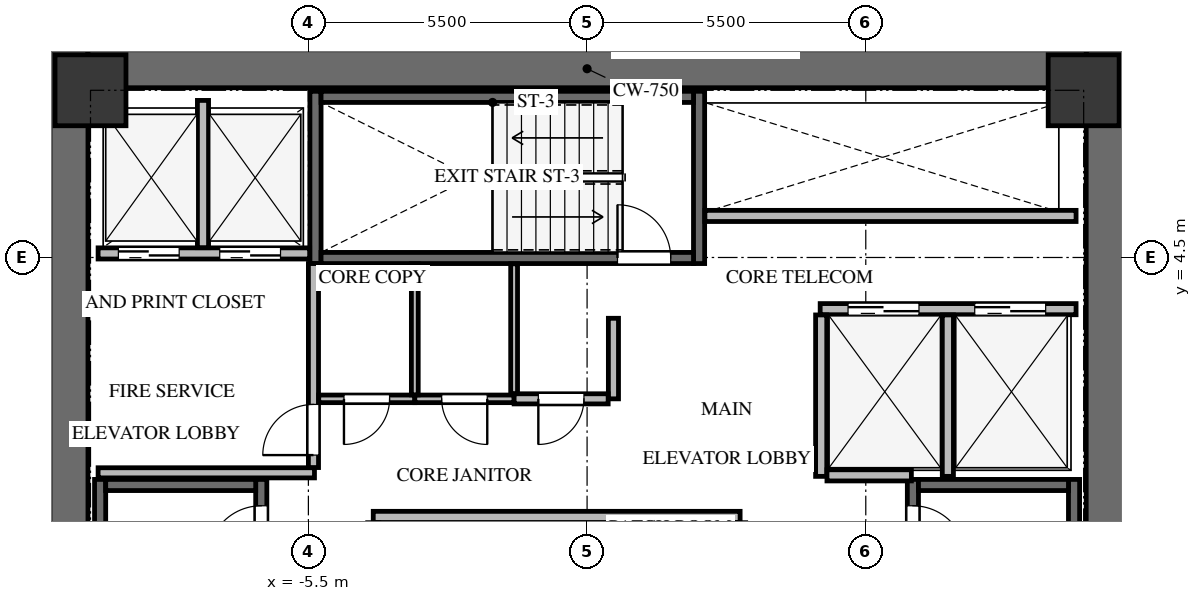
"""IFC4 building model, lengths in metres.
Left out: names, types, materials, properties, quantities, classifications, styles, units other than length and angle.
Written with IfcOpenShell. Run it as: python <this file> out.ifc"""

import sys

from ifc_helpers import new_model, si_unit, direction, frame, frame_2d, origin, origin_2d, place, context, subcontext, project, spatial, rectangle, extrude, source, transform, mapped, element, fill, save


model = new_model("IFC4")
c1 = context("Model", 3, precision=1e-05, world=origin(), true_north=direction((0.0, 1.0)))
c2 = subcontext(c1, "Body", "Model", "MODEL_VIEW")
j1 = project(units=[si_unit("LENGTHUNIT", "METRE"), si_unit("PLANEANGLEUNIT", "RADIAN")], contexts=[c1])
p1 = place(None, origin())
s1 = spatial("IfcSite", under=j1, at=p1, CompositionType="ELEMENT")
p2 = place(p1, origin())
s2 = spatial("IfcBuilding", under=s1, at=p2, CompositionType="ELEMENT")
p3 = place(p2, frame((0.0, 0.0, 133.8)))
s3 = spatial("IfcBuildingStorey", under=s2, at=p3, CompositionType="ELEMENT", Elevation=133.8)
for number, where, z_axis, x_axis in (
    (1, (-10.225, -8.6, 0.0), (0.0, 0.0, 1.0), (0.0, 1.0, 0.0)),
    (2, (10.225, -8.6, 0.0), (0.0, 0.0, 1.0), (0.0, 1.0, 0.0)),
):
    element("IfcWall", number, at=place(p3, frame(where, z_axis=z_axis, x_axis=x_axis)), inside=s3, PredefinedType="SHEAR", context=c2, shape_type="SweptSolid", body=[
        extrude(rectangle(XDim=17.2, YDim=0.75, at=frame_2d((8.6, 0.0))), origin(), (0.0, 0.0, 1.0), 3.3),
    ])
p4 = place(p3, frame((-9.85, 8.225, 0.0), z_axis=(0.0, 0.0, 1.0), x_axis=(1.0, 0.0, 0.0)))
e3 = element("IfcWall", 3, at=p4, inside=s3, PredefinedType="SHEAR", context=c2, shape_type="SweptSolid", body=[
    extrude(rectangle(XDim=19.7, YDim=0.75, at=frame_2d((9.85, 0.0))), origin(), (0.0, 0.0, 1.0), 3.3),
])
p5 = place(p3, frame((-6.43, -7.77, -0.24), z_axis=(0.0, 0.0, 1.0), x_axis=(0.0, 1.0, 0.0)))
e4 = element("IfcWall", 4, at=p5, inside=s3, PredefinedType="SHEAR", context=c2, shape_type="SweptSolid", body=[
    extrude(rectangle(XDim=7.89, YDim=0.22, at=frame_2d((3.945, 0.0))), origin(), (0.0, 0.0, 1.0), 3.3),
])
p6 = place(p5, frame((6.32, 0.0, 0.0)))
e5 = element("IfcOpeningElement", 5, at=p6, cuts=e4, PredefinedType="OPENING", context=c2, shape_type="SweptSolid", body=[
    extrude(rectangle(XDim=1.05, YDim=2.15, at=frame_2d((0.525, 1.075))), frame((0.0, 0.12, 0.0), z_axis=(0.0, -1.0, 0.0), x_axis=(1.0, 0.0, 0.0)), (0.0, 0.0, 1.0), 0.24),
])
p7 = place(p3, frame((-9.61, 0.12, -0.24), z_axis=(0.0, 0.0, 1.0), x_axis=(0.0, -1.0, 0.0)))
e6 = element("IfcWall", 6, at=p7, inside=s3, PredefinedType="SHEAR", context=c2, shape_type="SweptSolid", body=[
    extrude(rectangle(XDim=7.89, YDim=0.22, at=frame_2d((3.945, 0.0))), origin(), (0.0, 0.0, 1.0), 3.3),
])
p8 = place(p3, frame((-6.54, 0.01, -0.24), z_axis=(0.0, 0.0, 1.0), x_axis=(-1.0, 0.0, 0.0)))
e7 = element("IfcWall", 7, at=p8, inside=s3, PredefinedType="SHEAR", context=c2, shape_type="SweptSolid", body=[
    extrude(rectangle(XDim=2.96, YDim=0.22, at=frame_2d((1.48, 0.0))), origin(), (0.0, 0.0, 1.0), 3.3),
])
p9 = place(p3, frame((9.61, -7.77, -0.24), z_axis=(0.0, 0.0, 1.0), x_axis=(0.0, 1.0, 0.0)))
e8 = element("IfcWall", 8, at=p9, inside=s3, PredefinedType="SHEAR", context=c2, shape_type="SweptSolid", body=[
    extrude(rectangle(XDim=7.89, YDim=0.22, at=frame_2d((3.945, 0.0))), origin(), (0.0, 0.0, 1.0), 3.3),
])
p10 = place(p3, frame((6.43, 0.12, -0.24), z_axis=(0.0, 0.0, 1.0), x_axis=(0.0, -1.0, 0.0)))
e9 = element("IfcWall", 9, at=p10, inside=s3, PredefinedType="SHEAR", context=c2, shape_type="SweptSolid", body=[
    extrude(rectangle(XDim=7.89, YDim=0.22, at=frame_2d((3.945, 0.0))), origin(), (0.0, 0.0, 1.0), 3.3),
])
p11 = place(p10, frame((0.52, 0.0, 0.0)))
e10 = element("IfcOpeningElement", 10, at=p11, cuts=e9, PredefinedType="OPENING", context=c2, shape_type="SweptSolid", body=[
    extrude(rectangle(XDim=1.05, YDim=2.15, at=frame_2d((0.525, 1.075))), frame((0.0, 0.12, 0.0), z_axis=(0.0, -1.0, 0.0), x_axis=(1.0, 0.0, 0.0)), (0.0, 0.0, 1.0), 0.24),
])
p12 = place(p3, frame((9.5, 0.01, -0.24), z_axis=(0.0, 0.0, 1.0), x_axis=(-1.0, 0.0, 0.0)))
e11 = element("IfcWall", 11, at=p12, inside=s3, PredefinedType="SHEAR", context=c2, shape_type="SweptSolid", body=[
    extrude(rectangle(XDim=2.96, YDim=0.22, at=frame_2d((1.48, 0.0))), origin(), (0.0, 0.0, 1.0), 3.3),
])
for number, where, z_axis, x_axis in (
    (12, (2.21, 4.38, -0.24), (0.0, 0.0, 1.0), (0.0, 1.0, 0.0)),
    (13, (-5.36, 7.78, -0.24), (0.0, 0.0, 1.0), (0.0, -1.0, 0.0)),
):
    element("IfcWall", number, at=place(p3, frame(where, z_axis=z_axis, x_axis=x_axis)), inside=s3, PredefinedType="SHEAR", context=c2, shape_type="SweptSolid", body=[
        extrude(rectangle(XDim=3.4, YDim=0.22, at=frame_2d((1.7, 0.0))), origin(), (0.0, 0.0, 1.0), 3.3),
    ])
p13 = place(p3, frame((-5.25, 4.49, -0.24), z_axis=(0.0, 0.0, 1.0), x_axis=(1.0, 0.0, 0.0)))
e14 = element("IfcWall", 14, at=p13, inside=s3, PredefinedType="SHEAR", context=c2, shape_type="SweptSolid", body=[
    extrude(rectangle(XDim=7.35, YDim=0.22, at=frame_2d((3.675, 0.0))), origin(), (0.0, 0.0, 1.0), 3.3),
])
p14 = place(p13, frame((5.85, 0.0, 0.0)))
e15 = element("IfcOpeningElement", 15, at=p14, cuts=e14, PredefinedType="OPENING", context=c2, shape_type="SweptSolid", body=[
    extrude(rectangle(XDim=1.05, YDim=2.15, at=frame_2d((0.525, 1.075))), frame((0.0, 0.12, 0.0), z_axis=(0.0, -1.0, 0.0), x_axis=(1.0, 0.0, 0.0)), (0.0, 0.0, 1.0), 0.24),
])
p15 = place(p3, frame((2.1, 7.67, -0.24), z_axis=(0.0, 0.0, 1.0), x_axis=(-1.0, 0.0, 0.0)))
e16 = element("IfcWall", 16, at=p15, inside=s3, PredefinedType="SHEAR", context=c2, shape_type="SweptSolid", body=[
    extrude(rectangle(XDim=7.35, YDim=0.22, at=frame_2d((3.675, 0.0))), origin(), (0.0, 0.0, 1.0), 3.3),
])
m1 = source(origin(), c2, "Body", "SweptSolid", [
    extrude(rectangle(XDim=1.4, YDim=1.4, at=origin_2d()), origin(), (0.0, 0.0, 1.0), 3.3),
])
for number, where, z_axis, x_axis in (
    (17, (9.8, 7.8, -0.24), (0.0, 0.0, 1.0), (1.0, 0.0, 0.0)),
    (18, (-9.8, 7.8, -0.24), (0.0, 0.0, 1.0), (1.0, 0.0, 0.0)),
):
    element("IfcColumn", number, at=place(p3, frame(where, z_axis=z_axis, x_axis=x_axis)), inside=s3, PredefinedType="COLUMN", context=c2, shape_type="MappedRepresentation", body=[
        mapped(m1, transform((0.0, 0.0, 0.0), x_axis=(1.0, 0.0, 0.0), y_axis=(0.0, 1.0, 0.0), z_axis=(0.0, 0.0, 1.0), scale=1.0)),
    ])
p16 = place(p3, frame((-9.65, 4.58, 0.0), z_axis=(0.0, 0.0, 1.0), x_axis=(1.0, 0.0, 0.0)))
e19 = element("IfcWall", 19, at=p16, inside=s3, PredefinedType="SOLIDWALL", context=c2, shape_type="SweptSolid", body=[
    extrude(rectangle(XDim=4.175, YDim=0.22, at=frame_2d((2.087, 0.0))), origin(), (0.0, 0.0, 1.0), 3.045),
])
p17 = place(p16, frame((0.4, 0.0, 0.0)))
e20 = element("IfcOpeningElement", 20, at=p17, cuts=e19, PredefinedType="OPENING", context=c2, shape_type="SweptSolid", body=[
    extrude(rectangle(XDim=1.2, YDim=2.15, at=frame_2d((0.6, 1.075))), frame((0.0, 0.12, 0.0), z_axis=(0.0, -1.0, 0.0), x_axis=(1.0, 0.0, 0.0)), (0.0, 0.0, 1.0), 0.24),
])
p18 = place(p16, frame((2.4, 0.0, 0.0)))
e21 = element("IfcOpeningElement", 21, at=p18, cuts=e19, PredefinedType="OPENING", context=c2, shape_type="SweptSolid", body=[
    extrude(rectangle(XDim=1.2, YDim=2.15, at=frame_2d((0.6, 1.075))), frame((0.0, 0.12, 0.0), z_axis=(0.0, -1.0, 0.0), x_axis=(1.0, 0.0, 0.0)), (0.0, 0.0, 1.0), 0.24),
])
p19 = place(p3, frame((-7.58, 4.694, 0.0), z_axis=(0.0, 0.0, 1.0), x_axis=(0.0, 1.0, 0.0)))
e22 = element("IfcWall", 22, at=p19, inside=s3, PredefinedType="SOLIDWALL", context=c2, shape_type="SweptSolid", body=[
    extrude(rectangle(XDim=2.906, YDim=0.22, at=frame_2d((1.453, 0.0))), origin(), (0.0, 0.0, 1.0), 3.045),
])
p20 = place(p3, frame((-9.65, 0.25, 0.0), z_axis=(0.0, 0.0, 1.0), x_axis=(1.0, 0.0, 0.0)))
e23 = element("IfcWall", 23, at=p20, inside=s3, PredefinedType="SOLIDWALL", context=c2, shape_type="SweptSolid", body=[
    extrude(rectangle(XDim=4.27, YDim=0.2, at=frame_2d((2.135, 0.0))), origin(), (0.0, 0.0, 1.0), 3.045),
])
p21 = place(p3, frame((-5.4, 0.354, 0.0), z_axis=(0.0, 0.0, 1.0), x_axis=(0.0, 1.0, 0.0)))
e24 = element("IfcWall", 24, at=p21, inside=s3, PredefinedType="SOLIDWALL", context=c2, shape_type="SweptSolid", body=[
    extrude(rectangle(XDim=4.026, YDim=0.2, at=frame_2d((2.013, 0.0))), origin(), (0.0, 0.0, 1.0), 3.045),
])
p22 = place(p21, frame((0.246, 0.0, 0.0)))
e25 = element("IfcOpeningElement", 25, at=p22, cuts=e24, PredefinedType="OPENING", context=c2, shape_type="SweptSolid", body=[
    extrude(rectangle(XDim=1.0, YDim=2.15, at=frame_2d((0.5, 1.075))), frame((0.0, 0.11, 0.0), z_axis=(0.0, -1.0, 0.0), x_axis=(1.0, 0.0, 0.0)), (0.0, 0.0, 1.0), 0.22),
])
p23 = place(p3, frame((4.6, 3.48, 0.0), z_axis=(0.0, 0.0, 1.0), x_axis=(1.0, 0.0, 0.0)))
e26 = element("IfcWall", 26, at=p23, inside=s3, PredefinedType="SOLIDWALL", context=c2, shape_type="SweptSolid", body=[
    extrude(rectangle(XDim=5.05, YDim=0.22, at=frame_2d((2.525, 0.0))), origin(), (0.0, 0.0, 1.0), 3.045),
])
p24 = place(p23, frame((0.55, 0.0, 0.0)))
e27 = element("IfcOpeningElement", 27, at=p24, cuts=e26, PredefinedType="OPENING", context=c2, shape_type="SweptSolid", body=[
    extrude(rectangle(XDim=1.4, YDim=2.15, at=frame_2d((0.7, 1.075))), frame((0.0, 0.12, 0.0), z_axis=(0.0, -1.0, 0.0), x_axis=(1.0, 0.0, 0.0)), (0.0, 0.0, 1.0), 0.24),
])
p25 = place(p23, frame((3.05, 0.0, 0.0)))
e28 = element("IfcOpeningElement", 28, at=p25, cuts=e26, PredefinedType="OPENING", context=c2, shape_type="SweptSolid", body=[
    extrude(rectangle(XDim=1.4, YDim=2.15, at=frame_2d((0.7, 1.075))), frame((0.0, 0.12, 0.0), z_axis=(0.0, -1.0, 0.0), x_axis=(1.0, 0.0, 0.0)), (0.0, 0.0, 1.0), 0.24),
])
for number, where, z_axis, x_axis in (
    (29, (4.62, 0.18, 0.0), (0.0, 0.0, 1.0), (0.0, 1.0, 0.0)),
    (30, (7.12, 0.18, 0.0), (0.0, 0.0, 1.0), (0.0, 1.0, 0.0)),
):
    element("IfcWall", number, at=place(p3, frame(where, z_axis=z_axis, x_axis=x_axis)), inside=s3, PredefinedType="SOLIDWALL", context=c2, shape_type="SweptSolid", body=[
        extrude(rectangle(XDim=3.186, YDim=0.22, at=frame_2d((1.593, 0.0))), origin(), (0.0, 0.0, 1.0), 3.045),
    ])
p26 = place(p3, frame((4.734, 0.2, 0.0), z_axis=(0.0, 0.0, 1.0), x_axis=(1.0, 0.0, 0.0)))
e31 = element("IfcWall", 31, at=p26, inside=s3, PredefinedType="SOLIDWALL", context=c2, shape_type="SweptSolid", body=[
    extrude(rectangle(XDim=1.666, YDim=0.22, at=frame_2d((0.833, 0.0))), origin(), (0.0, 0.0, 1.0), 3.045),
])
p27 = place(p3, frame((-4.22, -0.62, 0.0), z_axis=(0.0, 0.0, 1.0), x_axis=(1.0, 0.0, 0.0)))
e32 = element("IfcWall", 32, at=p27, inside=s3, PredefinedType="SOLIDWALL", context=c2, shape_type="SweptSolid", body=[
    extrude(rectangle(XDim=7.24, YDim=0.22, at=frame_2d((3.62, 0.0))), origin(), (0.0, 0.0, 1.0), 3.045),
])
p28 = place(p3, frame((2.325, 5.32, 0.0), z_axis=(0.0, 0.0, 1.0), x_axis=(1.0, 0.0, 0.0)))
e33 = element("IfcWall", 33, at=p28, inside=s3, PredefinedType="SOLIDWALL", context=c2, shape_type="SweptSolid", body=[
    extrude(rectangle(XDim=7.325, YDim=0.22, at=frame_2d((3.663, 0.0))), origin(), (0.0, 0.0, 1.0), 3.045),
])
p29 = place(p3, frame((-3.4, 1.71, 0.0), z_axis=(0.0, 0.0, 1.0), x_axis=(-1.0, 0.0, 0.0)))
e34 = element("IfcWall", 34, at=p29, inside=s3, PredefinedType="PARTITIONING", context=c2, shape_type="SweptSolid", body=[
    extrude(rectangle(XDim=1.896, YDim=0.15, at=frame_2d((0.948, 0.0))), origin(), (0.0, 0.0, 1.0), 3.045),
])
p30 = place(p29, frame((0.498, 0.0, 0.0)))
e35 = element("IfcOpeningElement", 35, at=p30, cuts=e34, PredefinedType="OPENING", context=c2, shape_type="SweptSolid", body=[
    extrude(rectangle(XDim=0.9, YDim=2.05, at=frame_2d((0.45, 1.025))), frame((0.0, 0.085, 0.0), z_axis=(0.0, -1.0, 0.0), x_axis=(1.0, 0.0, 0.0)), (0.0, 0.0, 1.0), 0.17),
])
p31 = place(p3, frame((-1.44, 1.71, 0.0), z_axis=(0.0, 0.0, 1.0), x_axis=(-1.0, 0.0, 0.0)))
e36 = element("IfcWall", 36, at=p31, inside=s3, PredefinedType="PARTITIONING", context=c2, shape_type="SweptSolid", body=[
    extrude(rectangle(XDim=1.96, YDim=0.15, at=frame_2d((0.98, 0.0))), origin(), (0.0, 0.0, 1.0), 3.045),
])
p32 = place(p31, frame((0.53, 0.0, 0.0)))
e37 = element("IfcOpeningElement", 37, at=p32, cuts=e36, PredefinedType="OPENING", context=c2, shape_type="SweptSolid", body=[
    extrude(rectangle(XDim=0.9, YDim=2.05, at=frame_2d((0.45, 1.025))), frame((0.0, 0.085, 0.0), z_axis=(0.0, -1.0, 0.0), x_axis=(1.0, 0.0, 0.0)), (0.0, 0.0, 1.0), 0.17),
])
p33 = place(p3, frame((0.52, 3.3, 0.0), z_axis=(0.0, 0.0, 1.0), x_axis=(0.0, -1.0, 0.0)))
e38 = element("IfcWall", 38, at=p33, inside=s3, PredefinedType="SOLIDWALL", context=c2, shape_type="SweptSolid", body=[
    extrude(rectangle(XDim=1.59, YDim=0.2, at=frame_2d((0.795, 0.0))), origin(), (0.0, 0.0, 1.0), 3.045),
])
p34 = place(p3, frame((0.416, 1.71, 0.0), z_axis=(0.0, 0.0, 1.0), x_axis=(-1.0, 0.0, 0.0)))
e39 = element("IfcWall", 39, at=p34, inside=s3, PredefinedType="SOLIDWALL", context=c2, shape_type="SweptSolid", body=[
    extrude(rectangle(XDim=1.856, YDim=0.2, at=frame_2d((0.928, 0.0))), origin(), (0.0, 0.0, 1.0), 3.045),
])
p35 = place(p34, frame((0.478, 0.0, 0.0)))
e40 = element("IfcOpeningElement", 40, at=p35, cuts=e39, PredefinedType="OPENING", context=c2, shape_type="SweptSolid", body=[
    extrude(rectangle(XDim=0.9, YDim=2.05, at=frame_2d((0.45, 1.025))), frame((0.0, 0.11, 0.0), z_axis=(0.0, -1.0, 0.0), x_axis=(1.0, 0.0, 0.0)), (0.0, 0.0, 1.0), 0.22),
])
p36 = place(p3, frame((-3.4, 4.375, 0.0), z_axis=(0.0, 0.0, 1.0), x_axis=(0.0, -1.0, 0.0)))
e41 = element("IfcWall", 41, at=p36, inside=s3, PredefinedType="PARTITIONING", context=c2, shape_type="SweptSolid", body=[
    extrude(rectangle(XDim=2.586, YDim=0.135, at=frame_2d((1.293, 0.0))), origin(), (0.0, 0.0, 1.0), 3.045),
])
p37 = place(p3, frame((-1.44, 4.375, 0.0), z_axis=(0.0, 0.0, 1.0), x_axis=(0.0, -1.0, 0.0)))
e42 = element("IfcWall", 42, at=p37, inside=s3, PredefinedType="PARTITIONING", context=c2, shape_type="SweptSolid", body=[
    extrude(rectangle(XDim=2.561, YDim=0.135, at=frame_2d((1.281, 0.0))), origin(), (0.0, 0.0, 1.0), 3.045),
])
m2 = source(origin(), c2, "Body", "SweptSolid", [
    extrude(rectangle(XDim=1.05, YDim=2.15, at=frame_2d((0.525, 1.075))), frame((0.0, 0.025, 0.0), z_axis=(0.0, -1.0, 0.0), x_axis=(1.0, 0.0, 0.0)), (0.0, 0.0, 1.0), 0.05),
])
p38 = place(p6, origin())
e43 = element("IfcDoor", 43, at=p38, inside=s3, OperationType="SINGLE_SWING_LEFT", PredefinedType="DOOR", context=c2, shape_type="MappedRepresentation", body=[
    mapped(m2, transform((0.0, 0.0, 0.0), x_axis=(1.0, 0.0, 0.0), y_axis=(0.0, 1.0, 0.0), z_axis=(0.0, 0.0, 1.0), scale=1.0)),
])
fill(e5, e43)
m3 = source(origin(), c2, "Body", "SweptSolid", [
    extrude(rectangle(XDim=1.05, YDim=2.15, at=frame_2d((0.525, 1.075))), frame((0.0, 0.025, 0.0), z_axis=(0.0, -1.0, 0.0), x_axis=(1.0, 0.0, 0.0)), (0.0, 0.0, 1.0), 0.05),
])
p39 = place(p11, origin())
e44 = element("IfcDoor", 44, at=p39, inside=s3, OperationType="SINGLE_SWING_RIGHT", PredefinedType="DOOR", context=c2, shape_type="MappedRepresentation", body=[
    mapped(m3, transform((0.0, 0.0, 0.0), x_axis=(1.0, 0.0, 0.0), y_axis=(0.0, 1.0, 0.0), z_axis=(0.0, 0.0, 1.0), scale=1.0)),
])
fill(e10, e44)
p40 = place(p14, origin())
e45 = element("IfcDoor", 45, at=p40, inside=s3, OperationType="SINGLE_SWING_LEFT", PredefinedType="DOOR", context=c2, shape_type="MappedRepresentation", body=[
    mapped(m2, transform((0.0, 0.0, 0.0), x_axis=(1.0, 0.0, 0.0), y_axis=(0.0, 1.0, 0.0), z_axis=(0.0, 0.0, 1.0), scale=1.0)),
])
fill(e15, e45)
m4 = source(origin(), c2, "Body", "SweptSolid", [
    extrude(rectangle(XDim=1.2, YDim=2.15, at=frame_2d((0.6, 1.075))), frame((0.0, 0.025, 0.0), z_axis=(0.0, -1.0, 0.0), x_axis=(1.0, 0.0, 0.0)), (0.0, 0.0, 1.0), 0.05),
])
p41 = place(p17, origin())
e46 = element("IfcDoor", 46, at=p41, inside=s3, OperationType="DOUBLE_DOOR_SLIDING", PredefinedType="DOOR", context=c2, shape_type="MappedRepresentation", body=[
    mapped(m4, transform((0.0, 0.0, 0.0), x_axis=(1.0, 0.0, 0.0), y_axis=(0.0, 1.0, 0.0), z_axis=(0.0, 0.0, 1.0), scale=1.0)),
])
fill(e20, e46)
p42 = place(p18, origin())
e47 = element("IfcDoor", 47, at=p42, inside=s3, OperationType="DOUBLE_DOOR_SLIDING", PredefinedType="DOOR", context=c2, shape_type="MappedRepresentation", body=[
    mapped(m4, transform((0.0, 0.0, 0.0), x_axis=(1.0, 0.0, 0.0), y_axis=(0.0, 1.0, 0.0), z_axis=(0.0, 0.0, 1.0), scale=1.0)),
])
fill(e21, e47)
m5 = source(origin(), c2, "Body", "SweptSolid", [
    extrude(rectangle(XDim=1.0, YDim=2.15, at=frame_2d((0.5, 1.075))), frame((0.0, 0.025, 0.0), z_axis=(0.0, -1.0, 0.0), x_axis=(1.0, 0.0, 0.0)), (0.0, 0.0, 1.0), 0.05),
])
p43 = place(p22, origin())
e48 = element("IfcDoor", 48, at=p43, inside=s3, OperationType="SINGLE_SWING_LEFT", PredefinedType="DOOR", context=c2, shape_type="MappedRepresentation", body=[
    mapped(m5, transform((0.0, 0.0, 0.0), x_axis=(1.0, 0.0, 0.0), y_axis=(0.0, 1.0, 0.0), z_axis=(0.0, 0.0, 1.0), scale=1.0)),
])
fill(e25, e48)
m6 = source(origin(), c2, "Body", "SweptSolid", [
    extrude(rectangle(XDim=1.4, YDim=2.15, at=frame_2d((0.7, 1.075))), frame((0.0, 0.025, 0.0), z_axis=(0.0, -1.0, 0.0), x_axis=(1.0, 0.0, 0.0)), (0.0, 0.0, 1.0), 0.05),
])
p44 = place(p24, origin())
e49 = element("IfcDoor", 49, at=p44, inside=s3, OperationType="DOUBLE_DOOR_SLIDING", PredefinedType="DOOR", context=c2, shape_type="MappedRepresentation", body=[
    mapped(m6, transform((0.0, 0.0, 0.0), x_axis=(1.0, 0.0, 0.0), y_axis=(0.0, 1.0, 0.0), z_axis=(0.0, 0.0, 1.0), scale=1.0)),
])
fill(e27, e49)
p45 = place(p25, origin())
e50 = element("IfcDoor", 50, at=p45, inside=s3, OperationType="DOUBLE_DOOR_SLIDING", PredefinedType="DOOR", context=c2, shape_type="MappedRepresentation", body=[
    mapped(m6, transform((0.0, 0.0, 0.0), x_axis=(1.0, 0.0, 0.0), y_axis=(0.0, 1.0, 0.0), z_axis=(0.0, 0.0, 1.0), scale=1.0)),
])
fill(e28, e50)
m7 = source(origin(), c2, "Body", "SweptSolid", [
    extrude(rectangle(XDim=0.9, YDim=2.05, at=frame_2d((0.45, 1.025))), frame((0.0, 0.025, 0.0), z_axis=(0.0, -1.0, 0.0), x_axis=(1.0, 0.0, 0.0)), (0.0, 0.0, 1.0), 0.05),
])
p46 = place(p30, origin())
e51 = element("IfcDoor", 51, at=p46, inside=s3, OperationType="SINGLE_SWING_RIGHT", PredefinedType="DOOR", context=c2, shape_type="MappedRepresentation", body=[
    mapped(m7, transform((0.0, 0.0, 0.0), x_axis=(1.0, 0.0, 0.0), y_axis=(0.0, 1.0, 0.0), z_axis=(0.0, 0.0, 1.0), scale=1.0)),
])
fill(e35, e51)
m8 = source(origin(), c2, "Body", "SweptSolid", [
    extrude(rectangle(XDim=0.9, YDim=2.05, at=frame_2d((0.45, 1.025))), frame((0.0, 0.025, 0.0), z_axis=(0.0, -1.0, 0.0), x_axis=(1.0, 0.0, 0.0)), (0.0, 0.0, 1.0), 0.05),
])
p47 = place(p32, origin())
e52 = element("IfcDoor", 52, at=p47, inside=s3, OperationType="SINGLE_SWING_LEFT", PredefinedType="DOOR", context=c2, shape_type="MappedRepresentation", body=[
    mapped(m8, transform((0.0, 0.0, 0.0), x_axis=(1.0, 0.0, 0.0), y_axis=(0.0, 1.0, 0.0), z_axis=(0.0, 0.0, 1.0), scale=1.0)),
])
fill(e37, e52)
p48 = place(p35, origin())
e53 = element("IfcDoor", 53, at=p48, inside=s3, OperationType="SINGLE_SWING_RIGHT", PredefinedType="DOOR", context=c2, shape_type="MappedRepresentation", body=[
    mapped(m7, transform((0.0, 0.0, 0.0), x_axis=(1.0, 0.0, 0.0), y_axis=(0.0, 1.0, 0.0), z_axis=(0.0, 0.0, 1.0), scale=1.0)),
])
fill(e40, e53)
save(model, sys.argv[1])
